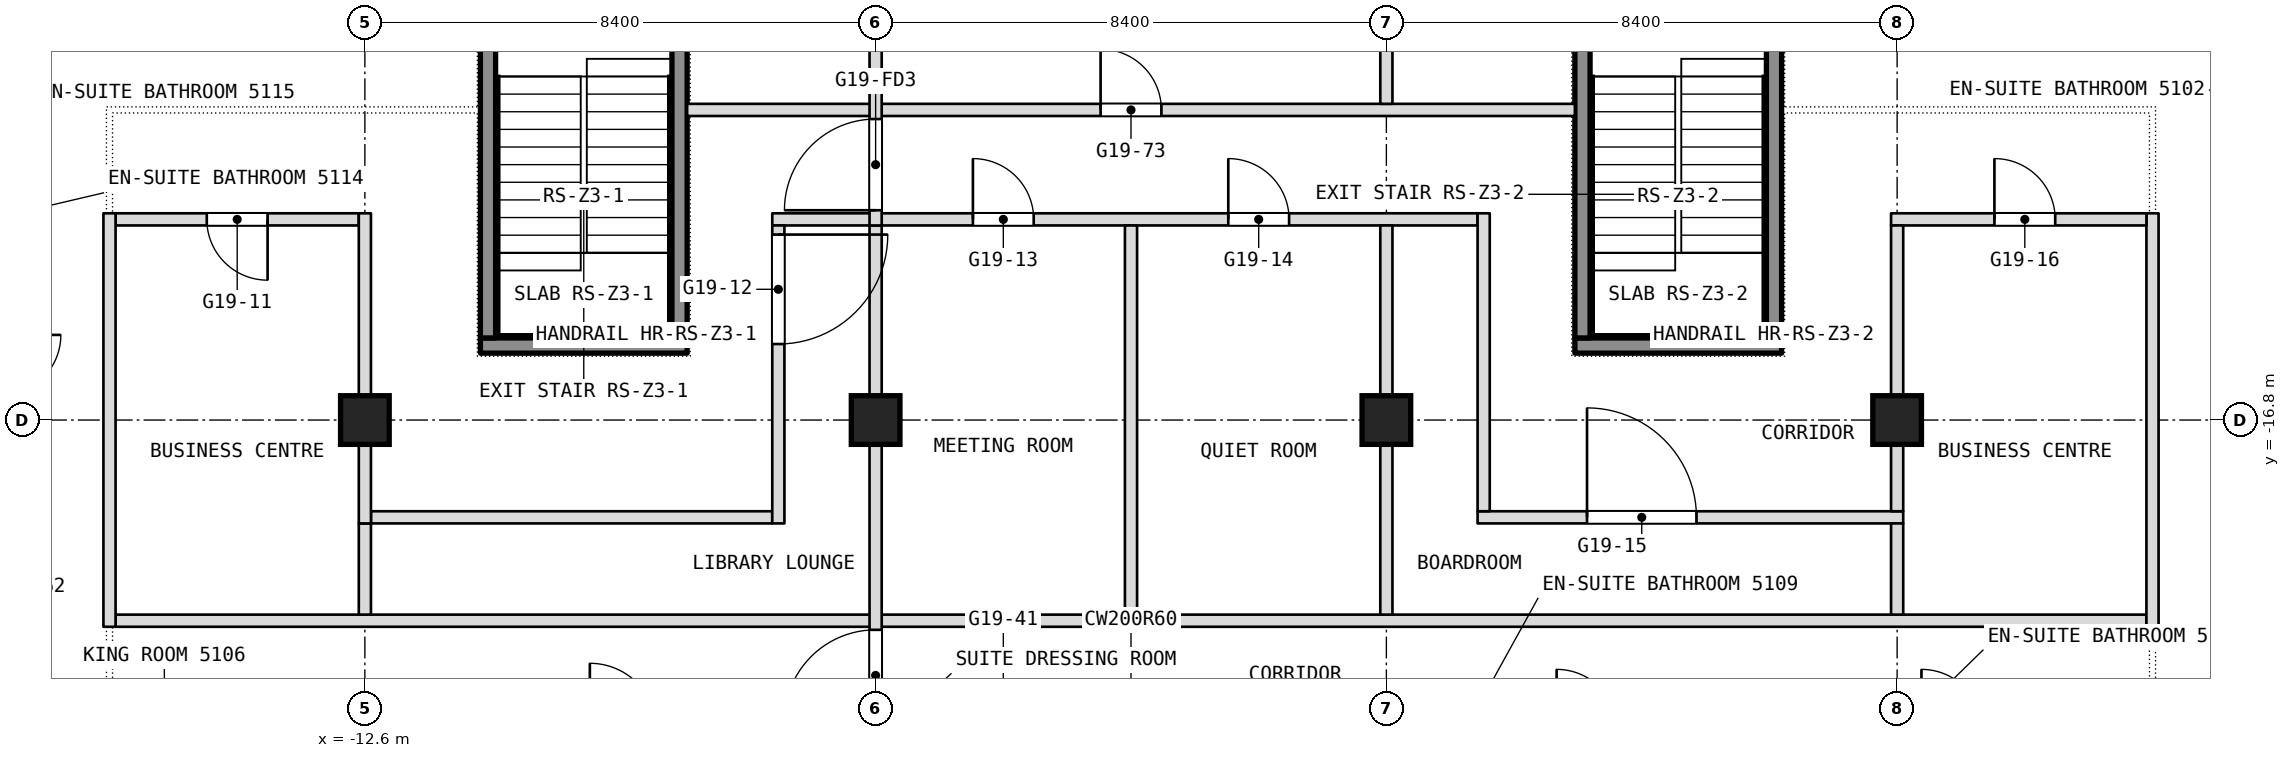
"""IFC4 building model, lengths in metres.
Left out: names, types, materials, properties, quantities, classifications, styles, units other than length and angle.
Written with IfcOpenShell. Run it as: python <this file> out.ifc"""

import sys

from ifc_helpers import new_model, si_unit, direction, frame, frame_2d, origin, origin_2d, place, context, subcontext, project, spatial, rectangle, extrude, element, fill, save


model = new_model("IFC4")
c1 = context("Model", 3, precision=1e-05, world=origin(), true_north=direction((0.0, 1.0)))
c2 = subcontext(c1, "Body", "Model", "MODEL_VIEW")
j1 = project(units=[si_unit("LENGTHUNIT", "METRE"), si_unit("PLANEANGLEUNIT", "RADIAN")], contexts=[c1])
p1 = place(None, origin())
s1 = spatial("IfcSite", under=j1, at=p1, CompositionType="ELEMENT")
p2 = place(p1, origin())
s2 = spatial("IfcBuilding", under=s1, at=p2, CompositionType="ELEMENT")
p3 = place(p2, frame((0.0, 0.0, 220.1)))
s3 = spatial("IfcBuildingStorey", under=s2, at=p3, CompositionType="ELEMENT", Elevation=220.1)
for number, where, z_axis, x_axis in (
    (1, (-12.6, -16.8, 0.0), (0.0, 0.0, 1.0), (1.0, 0.0, 0.0)),
    (2, (-4.2, -16.8, 0.0), (0.0, 0.0, 1.0), (1.0, 0.0, 0.0)),
    (3, (4.2, -16.8, 0.0), (0.0, 0.0, 1.0), (1.0, 0.0, 0.0)),
    (4, (12.6, -16.8, 0.0), (0.0, 0.0, 1.0), (1.0, 0.0, 0.0)),
):
    element("IfcColumn", number, at=place(p3, frame(where, z_axis=z_axis, x_axis=x_axis)), inside=s3, PredefinedType="COLUMN", context=c2, shape_type="SweptSolid", body=[
        extrude(rectangle(XDim=0.8, YDim=0.8, at=origin_2d()), origin(), (0.0, 0.0, 1.0), 3.6),
    ])
p4 = place(p3, frame((-16.7, -20.1, 0.0), z_axis=(0.0, 0.0, 1.0), x_axis=(1.0, 0.0, 0.0)))
e5 = element("IfcWall", 5, at=p4, inside=s3, PredefinedType="PARTITIONING", context=c2, shape_type="SweptSolid", body=[
    extrude(rectangle(XDim=33.4, YDim=0.2, at=frame_2d((16.7, 0.0))), origin(), (0.0, 0.0, 1.0), 3.34),
])
p5 = place(p3, frame((-12.5, -18.4, 0.0), z_axis=(0.0, 0.0, 1.0), x_axis=(1.0, 0.0, 0.0)))
e6 = element("IfcWall", 6, at=p5, inside=s3, PredefinedType="PARTITIONING", context=c2, shape_type="SweptSolid", body=[
    extrude(rectangle(XDim=6.6, YDim=0.2, at=frame_2d((3.3, 0.0))), origin(), (0.0, 0.0, 1.0), 3.34),
])
p6 = place(p3, frame((5.7, -18.4, 0.0), z_axis=(0.0, 0.0, 1.0), x_axis=(1.0, 0.0, 0.0)))
e7 = element("IfcWall", 7, at=p6, inside=s3, PredefinedType="PARTITIONING", context=c2, shape_type="SweptSolid", body=[
    extrude(rectangle(XDim=7.0, YDim=0.2, at=frame_2d((3.5, 0.0))), origin(), (0.0, 0.0, 1.0), 3.34),
])
p7 = place(p6, frame((1.8, 0.0, 0.0)))
e8 = element("IfcOpeningElement", 8, at=p7, cuts=e7, PredefinedType="OPENING", context=c2, shape_type="SweptSolid", body=[
    extrude(rectangle(XDim=1.8, YDim=2.1, at=frame_2d((0.9, 1.05))), frame((0.0, 0.1, 0.0), z_axis=(0.0, -1.0, 0.0), x_axis=(1.0, 0.0, 0.0)), (0.0, 0.0, 1.0), 0.2),
])
p8 = place(p3, frame((16.8, -20.2, 0.0), z_axis=(0.0, 0.0, 1.0), x_axis=(0.0, 1.0, 0.0)))
e9 = element("IfcWall", 9, at=p8, inside=s3, PredefinedType="PARTITIONING", context=c2, shape_type="SweptSolid", body=[
    extrude(rectangle(XDim=6.8, YDim=0.2, at=frame_2d((3.4, 0.0))), origin(), (0.0, 0.0, 1.0), 3.34),
])
p9 = place(p3, frame((-16.7, -13.5, 0.0), z_axis=(0.0, 0.0, 1.0), x_axis=(1.0, 0.0, 0.0)))
e10 = element("IfcWall", 10, at=p9, inside=s3, PredefinedType="PARTITIONING", context=c2, shape_type="SweptSolid", body=[
    extrude(rectangle(XDim=4.0, YDim=0.2, at=frame_2d((2.0, 0.0))), origin(), (0.0, 0.0, 1.0), 3.34),
])
p10 = place(p9, frame((1.5, 0.0, 0.0)))
e11 = element("IfcOpeningElement", 11, at=p10, cuts=e10, PredefinedType="OPENING", context=c2, shape_type="SweptSolid", body=[
    extrude(rectangle(XDim=1.0, YDim=2.1, at=frame_2d((0.5, 1.05))), frame((0.0, 0.1, 0.0), z_axis=(0.0, -1.0, 0.0), x_axis=(1.0, 0.0, 0.0)), (0.0, 0.0, 1.0), 0.2),
])
p11 = place(p3, frame((-5.9, -13.5, 0.0), z_axis=(0.0, 0.0, 1.0), x_axis=(1.0, 0.0, 0.0)))
e12 = element("IfcWall", 12, at=p11, inside=s3, PredefinedType="PARTITIONING", context=c2, shape_type="SweptSolid", body=[
    extrude(rectangle(XDim=11.6, YDim=0.2, at=frame_2d((5.8, 0.0))), origin(), (0.0, 0.0, 1.0), 3.34),
])
p12 = place(p11, frame((3.3, 0.0, 0.0)))
e13 = element("IfcOpeningElement", 13, at=p12, cuts=e12, PredefinedType="OPENING", context=c2, shape_type="SweptSolid", body=[
    extrude(rectangle(XDim=1.0, YDim=2.1, at=frame_2d((0.5, 1.05))), frame((0.0, 0.1, 0.0), z_axis=(0.0, -1.0, 0.0), x_axis=(1.0, 0.0, 0.0)), (0.0, 0.0, 1.0), 0.2),
])
p13 = place(p11, frame((7.5, 0.0, 0.0)))
e14 = element("IfcOpeningElement", 14, at=p13, cuts=e12, PredefinedType="OPENING", context=c2, shape_type="SweptSolid", body=[
    extrude(rectangle(XDim=1.0, YDim=2.1, at=frame_2d((0.5, 1.05))), frame((0.0, 0.1, 0.0), z_axis=(0.0, -1.0, 0.0), x_axis=(1.0, 0.0, 0.0)), (0.0, 0.0, 1.0), 0.2),
])
p14 = place(p3, frame((12.5, -13.5, 0.0), z_axis=(0.0, 0.0, 1.0), x_axis=(1.0, 0.0, 0.0)))
e15 = element("IfcWall", 15, at=p14, inside=s3, PredefinedType="PARTITIONING", context=c2, shape_type="SweptSolid", body=[
    extrude(rectangle(XDim=4.2, YDim=0.2, at=frame_2d((2.1, 0.0))), origin(), (0.0, 0.0, 1.0), 3.34),
])
p15 = place(p14, frame((1.7, 0.0, 0.0)))
e16 = element("IfcOpeningElement", 16, at=p15, cuts=e15, PredefinedType="OPENING", context=c2, shape_type="SweptSolid", body=[
    extrude(rectangle(XDim=1.0, YDim=2.1, at=frame_2d((0.5, 1.05))), frame((0.0, 0.1, 0.0), z_axis=(0.0, -1.0, 0.0), x_axis=(1.0, 0.0, 0.0)), (0.0, 0.0, 1.0), 0.2),
])
p16 = place(p3, frame((12.6, -20.0, 0.0), z_axis=(0.0, 0.0, 1.0), x_axis=(0.0, 1.0, 0.0)))
e17 = element("IfcWall", 17, at=p16, inside=s3, PredefinedType="PARTITIONING", context=c2, shape_type="SweptSolid", body=[
    extrude(rectangle(XDim=1.5, YDim=0.2, at=frame_2d((0.75, 0.0))), origin(), (0.0, 0.0, 1.0), 3.34),
])
p17 = place(p3, frame((12.6, -18.3, 0.0), z_axis=(0.0, 0.0, 1.0), x_axis=(0.0, 1.0, 0.0)))
e18 = element("IfcWall", 18, at=p17, inside=s3, PredefinedType="PARTITIONING", context=c2, shape_type="SweptSolid", body=[
    extrude(rectangle(XDim=4.7, YDim=0.2, at=frame_2d((2.35, 0.0))), origin(), (0.0, 0.0, 1.0), 3.34),
])
p18 = place(p3, frame((-7.3, -11.7, 0.0), z_axis=(0.0, 0.0, 1.0), x_axis=(1.0, 0.0, 0.0)))
e19 = element("IfcWall", 19, at=p18, inside=s3, PredefinedType="PARTITIONING", context=c2, shape_type="SweptSolid", body=[
    extrude(rectangle(XDim=14.6, YDim=0.2, at=frame_2d((7.3, 0.0))), origin(), (0.0, 0.0, 1.0), 3.34),
])
p19 = place(p18, frame((6.8, 0.0, 0.0)))
e20 = element("IfcOpeningElement", 20, at=p19, cuts=e19, PredefinedType="OPENING", context=c2, shape_type="SweptSolid", body=[
    extrude(rectangle(XDim=1.0, YDim=2.1, at=frame_2d((0.5, 1.05))), frame((0.0, 0.1, 0.0), z_axis=(0.0, -1.0, 0.0), x_axis=(1.0, 0.0, 0.0)), (0.0, 0.0, 1.0), 0.2),
])
p20 = place(p3, frame((5.8, -18.3, 0.0), z_axis=(0.0, 0.0, 1.0), x_axis=(0.0, 1.0, 0.0)))
e21 = element("IfcWall", 21, at=p20, inside=s3, PredefinedType="PARTITIONING", context=c2, shape_type="SweptSolid", body=[
    extrude(rectangle(XDim=4.9, YDim=0.2, at=frame_2d((2.45, 0.0))), origin(), (0.0, 0.0, 1.0), 3.34),
])
p21 = place(p3, frame((4.2, -20.0, 0.0), z_axis=(0.0, 0.0, 1.0), x_axis=(0.0, 1.0, 0.0)))
e22 = element("IfcWall", 22, at=p21, inside=s3, PredefinedType="PARTITIONING", context=c2, shape_type="SweptSolid", body=[
    extrude(rectangle(XDim=6.4, YDim=0.2, at=frame_2d((3.2, 0.0))), origin(), (0.0, 0.0, 1.0), 3.34),
])
p22 = place(p3, frame((4.2, -11.6, 0.0), z_axis=(0.0, 0.0, 1.0), x_axis=(0.0, 1.0, 0.0)))
e23 = element("IfcWall", 23, at=p22, inside=s3, PredefinedType="PARTITIONING", context=c2, shape_type="SweptSolid", body=[
    extrude(rectangle(XDim=9.7, YDim=0.2, at=frame_2d((4.85, 0.0))), origin(), (0.0, 0.0, 1.0), 3.34),
])
p23 = place(p3, frame((0.0, -20.0, 0.0), z_axis=(0.0, 0.0, 1.0), x_axis=(0.0, 1.0, 0.0)))
e24 = element("IfcWall", 24, at=p23, inside=s3, PredefinedType="PARTITIONING", context=c2, shape_type="SweptSolid", body=[
    extrude(rectangle(XDim=6.4, YDim=0.2, at=frame_2d((3.2, 0.0))), origin(), (0.0, 0.0, 1.0), 3.34),
])
p24 = place(p3, frame((-4.2, -22.0, 0.0), z_axis=(0.0, 0.0, 1.0), x_axis=(0.0, 1.0, 0.0)))
e25 = element("IfcWall", 25, at=p24, inside=s3, PredefinedType="PARTITIONING", context=c2, shape_type="SweptSolid", body=[
    extrude(rectangle(XDim=8.4, YDim=0.2, at=frame_2d((4.2, 0.0))), origin(), (0.0, 0.0, 1.0), 3.34),
])
p25 = place(p24, frame((0.25, 0.0, 0.0)))
e26 = element("IfcOpeningElement", 26, at=p25, cuts=e25, PredefinedType="OPENING", context=c2, shape_type="SweptSolid", body=[
    extrude(rectangle(XDim=1.5, YDim=2.1, at=frame_2d((0.75, 1.05))), frame((0.0, 0.1, 0.0), z_axis=(0.0, -1.0, 0.0), x_axis=(1.0, 0.0, 0.0)), (0.0, 0.0, 1.0), 0.2),
])
p26 = place(p3, frame((-4.2, -13.6, 0.0), z_axis=(0.0, 0.0, 1.0), x_axis=(0.0, 1.0, 0.0)))
e27 = element("IfcWall", 27, at=p26, inside=s3, PredefinedType="PARTITIONING", context=c2, shape_type="SweptSolid", body=[
    extrude(rectangle(XDim=13.6, YDim=0.2, at=frame_2d((6.8, 0.0))), origin(), (0.0, 0.0, 1.0), 3.34),
])
p27 = place(p26, frame((11.95, 0.0, 0.0)))
e28 = element("IfcOpeningElement", 28, at=p27, cuts=e27, PredefinedType="OPENING", context=c2, shape_type="SweptSolid", body=[
    extrude(rectangle(XDim=1.5, YDim=2.1, at=frame_2d((0.75, 1.05))), frame((0.0, 0.1, 0.0), z_axis=(0.0, -1.0, 0.0), x_axis=(1.0, 0.0, 0.0)), (0.0, 0.0, 1.0), 0.2),
])
p28 = place(p26, frame((0.25, 0.0, 0.0)))
e29 = element("IfcOpeningElement", 29, at=p28, cuts=e27, PredefinedType="OPENING", context=c2, shape_type="SweptSolid", body=[
    extrude(rectangle(XDim=1.5, YDim=2.1, at=frame_2d((0.75, 1.05))), frame((0.0, 0.1, 0.0), z_axis=(0.0, -1.0, 0.0), x_axis=(1.0, 0.0, 0.0)), (0.0, 0.0, 1.0), 0.2),
])
p29 = place(p3, frame((-5.8, -18.5, 0.0), z_axis=(0.0, 0.0, 1.0), x_axis=(0.0, 1.0, 0.0)))
e30 = element("IfcWall", 30, at=p29, inside=s3, PredefinedType="PARTITIONING", context=c2, shape_type="SweptSolid", body=[
    extrude(rectangle(XDim=4.9, YDim=0.2, at=frame_2d((2.45, 0.0))), origin(), (0.0, 0.0, 1.0), 3.34),
])
p30 = place(p29, frame((2.95, 0.0, 0.0)))
e31 = element("IfcOpeningElement", 31, at=p30, cuts=e30, PredefinedType="OPENING", context=c2, shape_type="SweptSolid", body=[
    extrude(rectangle(XDim=1.8, YDim=2.1, at=frame_2d((0.9, 1.05))), frame((0.0, 0.1, 0.0), z_axis=(0.0, -1.0, 0.0), x_axis=(1.0, 0.0, 0.0)), (0.0, 0.0, 1.0), 0.2),
])
p31 = place(p3, frame((-12.6, -20.0, 0.0), z_axis=(0.0, 0.0, 1.0), x_axis=(0.0, 1.0, 0.0)))
e32 = element("IfcWall", 32, at=p31, inside=s3, PredefinedType="PARTITIONING", context=c2, shape_type="SweptSolid", body=[
    extrude(rectangle(XDim=1.5, YDim=0.2, at=frame_2d((0.75, 0.0))), origin(), (0.0, 0.0, 1.0), 3.34),
])
p32 = place(p3, frame((-12.6, -18.5, 0.0), z_axis=(0.0, 0.0, 1.0), x_axis=(0.0, 1.0, 0.0)))
e33 = element("IfcWall", 33, at=p32, inside=s3, PredefinedType="PARTITIONING", context=c2, shape_type="SweptSolid", body=[
    extrude(rectangle(XDim=5.1, YDim=0.2, at=frame_2d((2.55, 0.0))), origin(), (0.0, 0.0, 1.0), 3.34),
])
p33 = place(p3, frame((-16.8, -20.2, 0.0), z_axis=(0.0, 0.0, 1.0), x_axis=(0.0, 1.0, 0.0)))
e34 = element("IfcWall", 34, at=p33, inside=s3, PredefinedType="PARTITIONING", context=c2, shape_type="SweptSolid", body=[
    extrude(rectangle(XDim=6.8, YDim=0.2, at=frame_2d((3.4, 0.0))), origin(), (0.0, 0.0, 1.0), 3.34),
])
p34 = place(p3, frame((-10.7, -15.575, 0.1), z_axis=(0.0, 0.0, 1.0), x_axis=(1.0, 0.0, 0.0)))
e35 = element("IfcWall", 35, at=p34, inside=s3, PredefinedType="SHEAR", context=c2, shape_type="SweptSolid", body=[
    extrude(rectangle(XDim=3.4, YDim=0.25, at=frame_2d((1.7, 0.0))), origin(), (0.0, 0.0, 1.0), 3.6),
])
for number, where, z_axis, x_axis in (
    (36, (-10.575, -15.45, 0.1), (0.0, 0.0, 1.0), (0.0, 1.0, 0.0)),
    (37, (-7.425, -15.45, 0.1), (0.0, 0.0, 1.0), (0.0, 1.0, 0.0)),
):
    element("IfcWall", number, at=place(p3, frame(where, z_axis=z_axis, x_axis=x_axis)), inside=s3, PredefinedType="SHEAR", context=c2, shape_type="SweptSolid", body=[
        extrude(rectangle(XDim=5.7, YDim=0.25, at=frame_2d((2.85, 0.0))), origin(), (0.0, 0.0, 1.0), 3.6),
    ])
p35 = place(p3, frame((7.3, -15.575, 0.1), z_axis=(0.0, 0.0, 1.0), x_axis=(1.0, 0.0, 0.0)))
e38 = element("IfcWall", 38, at=p35, inside=s3, PredefinedType="SHEAR", context=c2, shape_type="SweptSolid", body=[
    extrude(rectangle(XDim=3.4, YDim=0.25, at=frame_2d((1.7, 0.0))), origin(), (0.0, 0.0, 1.0), 3.6),
])
for number, where, z_axis, x_axis in (
    (39, (7.425, -15.45, 0.1), (0.0, 0.0, 1.0), (0.0, 1.0, 0.0)),
    (40, (10.575, -15.45, 0.1), (0.0, 0.0, 1.0), (0.0, 1.0, 0.0)),
):
    element("IfcWall", number, at=place(p3, frame(where, z_axis=z_axis, x_axis=x_axis)), inside=s3, PredefinedType="SHEAR", context=c2, shape_type="SweptSolid", body=[
        extrude(rectangle(XDim=5.7, YDim=0.25, at=frame_2d((2.85, 0.0))), origin(), (0.0, 0.0, 1.0), 3.6),
    ])
p36 = place(p7, origin())
e41 = element("IfcDoor", 41, at=p36, inside=s3, OperationType="DOUBLE_DOOR_SINGLE_SWING", PredefinedType="DOOR", context=c2, shape_type="SweptSolid", body=[
    extrude(rectangle(XDim=1.8, YDim=2.1, at=frame_2d((0.9, 1.05))), frame((0.0, 0.025, 0.0), z_axis=(0.0, -1.0, 0.0), x_axis=(1.0, 0.0, 0.0)), (0.0, 0.0, 1.0), 0.05),
])
fill(e8, e41)
p37 = place(p10, origin())
e42 = element("IfcDoor", 42, at=p37, inside=s3, OperationType="SINGLE_SWING_LEFT", PredefinedType="DOOR", context=c2, shape_type="SweptSolid", body=[
    extrude(rectangle(XDim=1.0, YDim=2.1, at=frame_2d((0.5, 1.05))), frame((0.0, 0.025, 0.0), z_axis=(0.0, -1.0, 0.0), x_axis=(1.0, 0.0, 0.0)), (0.0, 0.0, 1.0), 0.05),
])
fill(e11, e42)
p38 = place(p12, origin())
e43 = element("IfcDoor", 43, at=p38, inside=s3, OperationType="SINGLE_SWING_LEFT", PredefinedType="DOOR", context=c2, shape_type="SweptSolid", body=[
    extrude(rectangle(XDim=1.0, YDim=2.1, at=frame_2d((0.5, 1.05))), frame((0.0, 0.025, 0.0), z_axis=(0.0, -1.0, 0.0), x_axis=(1.0, 0.0, 0.0)), (0.0, 0.0, 1.0), 0.05),
])
fill(e13, e43)
p39 = place(p13, origin())
e44 = element("IfcDoor", 44, at=p39, inside=s3, OperationType="SINGLE_SWING_RIGHT", PredefinedType="DOOR", context=c2, shape_type="SweptSolid", body=[
    extrude(rectangle(XDim=1.0, YDim=2.1, at=frame_2d((0.5, 1.05))), frame((0.0, 0.025, 0.0), z_axis=(0.0, -1.0, 0.0), x_axis=(1.0, 0.0, 0.0)), (0.0, 0.0, 1.0), 0.05),
])
fill(e14, e44)
p40 = place(p15, origin())
e45 = element("IfcDoor", 45, at=p40, inside=s3, OperationType="SINGLE_SWING_RIGHT", PredefinedType="DOOR", context=c2, shape_type="SweptSolid", body=[
    extrude(rectangle(XDim=1.0, YDim=2.1, at=frame_2d((0.5, 1.05))), frame((0.0, 0.025, 0.0), z_axis=(0.0, -1.0, 0.0), x_axis=(1.0, 0.0, 0.0)), (0.0, 0.0, 1.0), 0.05),
])
fill(e16, e45)
p41 = place(p19, origin())
e46 = element("IfcDoor", 46, at=p41, inside=s3, OperationType="SINGLE_SWING_LEFT", PredefinedType="DOOR", context=c2, shape_type="SweptSolid", body=[
    extrude(rectangle(XDim=1.0, YDim=2.1, at=frame_2d((0.5, 1.05))), frame((0.0, 0.025, 0.0), z_axis=(0.0, -1.0, 0.0), x_axis=(1.0, 0.0, 0.0)), (0.0, 0.0, 1.0), 0.05),
])
fill(e20, e46)
p42 = place(p30, origin())
e47 = element("IfcDoor", 47, at=p42, inside=s3, OperationType="DOUBLE_DOOR_SINGLE_SWING", PredefinedType="DOOR", context=c2, shape_type="SweptSolid", body=[
    extrude(rectangle(XDim=1.8, YDim=2.1, at=frame_2d((0.9, 1.05))), frame((0.0, 0.025, 0.0), z_axis=(0.0, -1.0, 0.0), x_axis=(1.0, 0.0, 0.0)), (0.0, 0.0, 1.0), 0.05),
])
fill(e31, e47)
p43 = place(p28, origin())
e48 = element("IfcDoor", 48, at=p43, inside=s3, OperationType="DOUBLE_DOOR_DOUBLE_SWING", PredefinedType="DOOR", context=c2, shape_type="SweptSolid", body=[
    extrude(rectangle(XDim=1.5, YDim=2.1, at=frame_2d((0.75, 1.05))), frame((0.0, 0.025, 0.0), z_axis=(0.0, -1.0, 0.0), x_axis=(1.0, 0.0, 0.0)), (0.0, 0.0, 1.0), 0.05),
])
fill(e29, e48)
p44 = place(p25, origin())
e49 = element("IfcDoor", 49, at=p44, inside=s3, OperationType="DOUBLE_DOOR_DOUBLE_SWING", PredefinedType="DOOR", context=c2, shape_type="SweptSolid", body=[
    extrude(rectangle(XDim=1.5, YDim=2.1, at=frame_2d((0.75, 1.05))), frame((0.0, 0.025, 0.0), z_axis=(0.0, -1.0, 0.0), x_axis=(1.0, 0.0, 0.0)), (0.0, 0.0, 1.0), 0.05),
])
fill(e26, e49)
save(model, sys.argv[1])
